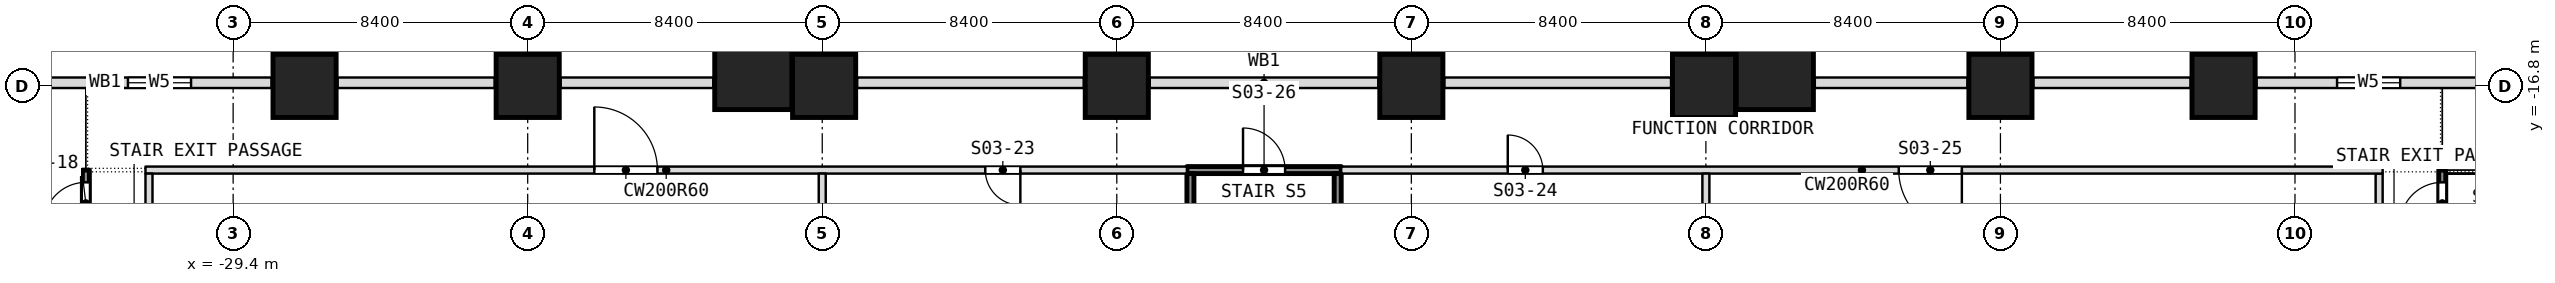
"""IFC4 building model, lengths in metres.
Left out: names, types, materials, properties, quantities, classifications, styles, units other than length and angle.
Written with IfcOpenShell. Run it as: python <this file> out.ifc"""

import sys

from ifc_helpers import new_model, si_unit, direction, frame, frame_2d, origin, origin_2d, place, context, subcontext, project, spatial, polyline, rectangle, outline, extrude, element, fill, save


model = new_model("IFC4")
c1 = context("Model", 3, precision=1e-05, world=origin(), true_north=direction((0.0, 1.0)))
c2 = subcontext(c1, "Body", "Model", "MODEL_VIEW")
j1 = project(units=[si_unit("LENGTHUNIT", "METRE"), si_unit("PLANEANGLEUNIT", "RADIAN")], contexts=[c1])
p1 = place(None, origin())
s1 = spatial("IfcSite", under=j1, at=p1, CompositionType="ELEMENT")
p2 = place(p1, origin())
s2 = spatial("IfcBuilding", under=s1, at=p2, CompositionType="ELEMENT")
p3 = place(p2, frame((0.0, 0.0, 13.0)))
s3 = spatial("IfcBuildingStorey", under=s2, at=p3, CompositionType="ELEMENT", Elevation=13.0)
for number, where, z_axis, x_axis in (
    (1, (-21.0, -16.8, 0.0), (0.0, 0.0, 1.0), (1.0, 0.0, 0.0)),
    (2, (-12.546, -16.8, 0.0), (0.0, 0.0, 1.0), (1.0, 0.0, 0.0)),
    (3, (-4.2, -16.8, 0.0), (0.0, 0.0, 1.0), (1.0, 0.0, 0.0)),
    (4, (4.2, -16.8, 0.0), (0.0, 0.0, 1.0), (1.0, 0.0, 0.0)),
    (5, (12.546, -16.8, 0.0), (0.0, 0.0, 1.0), (1.0, 0.0, 0.0)),
    (6, (21.0, -16.8, 0.0), (0.0, 0.0, 1.0), (1.0, 0.0, 0.0)),
    (7, (-27.363, -16.8, 0.0), (0.0, 0.0, 1.0), (1.0, 0.0, 0.0)),
    (8, (27.363, -16.8, 0.0), (0.0, 0.0, 1.0), (1.0, 0.0, 0.0)),
):
    element("IfcColumn", number, at=place(p3, frame(where, z_axis=z_axis, x_axis=x_axis)), inside=s3, PredefinedType="COLUMN", context=c2, shape_type="SweptSolid", body=[
        extrude(rectangle(XDim=1.8, YDim=1.8, at=origin_2d()), origin(), (0.0, 0.0, 1.0), 8.0),
    ])
for number, where, z_axis, x_axis in (
    (9, (-14.566, -16.375, 0.0), (0.0, 0.0, 1.0), (1.0, 0.0, 0.0)),
    (10, (14.566, -16.375, 0.0), (0.0, 0.0, 1.0), (1.0, 0.0, 0.0)),
):
    element("IfcColumn", number, at=place(p3, frame(where, z_axis=z_axis, x_axis=x_axis)), inside=s3, PredefinedType="COLUMN", context=c2, shape_type="SweptSolid", body=[
        extrude(rectangle(XDim=2.2, YDim=2.2, at=origin_2d()), origin(), (0.0, 0.0, 1.0), 8.0),
    ])
p4 = place(p3, frame((37.8, -18.0, 7.414), z_axis=(1.0, 0.0, 0.0), x_axis=(0.0, 0.449444543056, 0.893308234999)))
e11 = element("IfcWall", 11, at=p4, inside=s3, PredefinedType="SOLIDWALL", context=c2, shape_type="SweptSolid", body=[
    extrude(outline(polyline([(0.0, 0.0), (0.656, 0.0), (-0.016, 1.335), (-7.162, -2.26), (0.0, 0.0)])), origin(), (0.0, 0.0, -1.0), 4.2),
])
p5 = place(p3, frame((-37.8, -18.0, 7.414), z_axis=(-1.0, 0.0, 0.0), x_axis=(0.0, -0.159774095721, -0.987153604226)))
e12 = element("IfcWall", 12, at=p5, inside=s3, PredefinedType="SOLIDWALL", context=c2, shape_type="SweptSolid", body=[
    extrude(outline(polyline([(0.0, 0.0), (7.51, 2.22e-16), (-0.387, 1.278), (-0.626, -0.197), (0.0, 0.0)])), origin(), (0.0, 0.0, -1.0), 4.2),
])
p6 = place(p3, frame((33.6, -22.3, 0.0), z_axis=(0.0, 0.0, 1.0), x_axis=(0.0, 1.0, 0.0)))
e13 = element("IfcWall", 13, at=p6, inside=s3, PredefinedType="PARTITIONING", context=c2, shape_type="SweptSolid", body=[
    extrude(rectangle(XDim=3.1, YDim=0.2, at=frame_2d((1.55, 0.0))), origin(), (0.0, 0.0, 1.0), 7.68),
])
p7 = place(p6, frame((1.55, 0.0, 0.0)))
e14 = element("IfcOpeningElement", 14, at=p7, cuts=e13, PredefinedType="OPENING", context=c2, shape_type="SweptSolid", body=[
    extrude(rectangle(XDim=1.2, YDim=2.1, at=frame_2d((0.6, 1.05))), frame((0.0, 0.1, 0.0), z_axis=(0.0, -1.0, 0.0), x_axis=(1.0, 0.0, 0.0)), (0.0, 0.0, 1.0), 0.2),
])
p8 = place(p3, frame((31.8, -22.1, 0.0), z_axis=(0.0, 0.0, 1.0), x_axis=(0.0, 1.0, 0.0)))
e15 = element("IfcWall", 15, at=p8, inside=s3, PredefinedType="PARTITIONING", context=c2, shape_type="SweptSolid", body=[
    extrude(rectangle(XDim=2.8, YDim=0.2, at=frame_2d((1.4, 0.0))), origin(), (0.0, 0.0, 1.0), 7.68),
])
p9 = place(p3, frame((-31.9, -19.2, 0.0), z_axis=(0.0, 0.0, 1.0), x_axis=(1.0, 0.0, 0.0)))
e16 = element("IfcWall", 16, at=p9, inside=s3, PredefinedType="PARTITIONING", context=c2, shape_type="SweptSolid", body=[
    extrude(rectangle(XDim=29.7, YDim=0.2, at=frame_2d((14.85, 0.0))), origin(), (0.0, 0.0, 1.0), 7.68),
])
p10 = place(p9, frame((12.8, 0.0, 0.0)))
e17 = element("IfcOpeningElement", 17, at=p10, cuts=e16, PredefinedType="OPENING", context=c2, shape_type="SweptSolid", body=[
    extrude(rectangle(XDim=1.8, YDim=2.1, at=frame_2d((0.9, 1.05))), frame((0.0, 0.1, 0.0), z_axis=(0.0, -1.0, 0.0), x_axis=(1.0, 0.0, 0.0)), (0.0, 0.0, 1.0), 0.2),
])
p11 = place(p9, frame((23.95, 0.0, 0.0)))
e18 = element("IfcOpeningElement", 18, at=p11, cuts=e16, PredefinedType="OPENING", context=c2, shape_type="SweptSolid", body=[
    extrude(rectangle(XDim=1.0, YDim=2.1, at=frame_2d((0.5, 1.05))), frame((0.0, 0.1, 0.0), z_axis=(0.0, -1.0, 0.0), x_axis=(1.0, 0.0, 0.0)), (0.0, 0.0, 1.0), 0.2),
])
p12 = place(p3, frame((2.2, -19.2, 0.0), z_axis=(0.0, 0.0, 1.0), x_axis=(1.0, 0.0, 0.0)))
e19 = element("IfcWall", 19, at=p12, inside=s3, PredefinedType="PARTITIONING", context=c2, shape_type="SweptSolid", body=[
    extrude(rectangle(XDim=29.7, YDim=0.2, at=frame_2d((14.85, 0.0))), origin(), (0.0, 0.0, 1.0), 7.68),
])
p13 = place(p12, frame((4.75, 0.0, 0.0)))
e20 = element("IfcOpeningElement", 20, at=p13, cuts=e19, PredefinedType="OPENING", context=c2, shape_type="SweptSolid", body=[
    extrude(rectangle(XDim=1.0, YDim=2.1, at=frame_2d((0.5, 1.05))), frame((0.0, 0.1, 0.0), z_axis=(0.0, -1.0, 0.0), x_axis=(1.0, 0.0, 0.0)), (0.0, 0.0, 1.0), 0.2),
])
p14 = place(p12, frame((15.9, 0.0, 0.0)))
e21 = element("IfcOpeningElement", 21, at=p14, cuts=e19, PredefinedType="OPENING", context=c2, shape_type="SweptSolid", body=[
    extrude(rectangle(XDim=1.8, YDim=2.1, at=frame_2d((0.9, 1.05))), frame((0.0, 0.1, 0.0), z_axis=(0.0, -1.0, 0.0), x_axis=(1.0, 0.0, 0.0)), (0.0, 0.0, 1.0), 0.2),
])
p15 = place(p3, frame((-2.2, -19.2, 0.0), z_axis=(0.0, 0.0, 1.0), x_axis=(1.0, 0.0, 0.0)))
e22 = element("IfcWall", 22, at=p15, inside=s3, PredefinedType="PARTITIONING", context=c2, shape_type="SweptSolid", body=[
    extrude(rectangle(XDim=4.4, YDim=0.2, at=frame_2d((2.2, 0.0))), origin(), (0.0, 0.0, 1.0), 7.68),
])
p16 = place(p15, frame((1.6, 0.0, 0.0)))
e23 = element("IfcOpeningElement", 23, at=p16, cuts=e22, PredefinedType="OPENING", context=c2, shape_type="SweptSolid", body=[
    extrude(rectangle(XDim=1.2, YDim=2.1, at=frame_2d((0.6, 1.05))), frame((0.0, 0.1, 0.0), z_axis=(0.0, -1.0, 0.0), x_axis=(1.0, 0.0, 0.0)), (0.0, 0.0, 1.0), 0.2),
])
p17 = place(p3, frame((12.6, -25.5, 0.0), z_axis=(0.0, 0.0, 1.0), x_axis=(0.0, 1.0, 0.0)))
e24 = element("IfcWall", 24, at=p17, inside=s3, PredefinedType="PARTITIONING", context=c2, shape_type="SweptSolid", body=[
    extrude(rectangle(XDim=6.2, YDim=0.2, at=frame_2d((3.1, 0.0))), origin(), (0.0, 0.0, 1.0), 7.68),
])
for number, where, z_axis, x_axis in (
    (25, (2.1, -25.14, 0.0), (0.0, 0.0, 1.0), (0.0, 1.0, 0.0)),
    (26, (-2.1, -25.14, 0.0), (0.0, 0.0, 1.0), (0.0, 1.0, 0.0)),
):
    element("IfcWall", number, at=place(p3, frame(where, z_axis=z_axis, x_axis=x_axis)), inside=s3, PredefinedType="PARTITIONING", context=c2, shape_type="SweptSolid", body=[
        extrude(rectangle(XDim=5.84, YDim=0.2, at=frame_2d((2.92, 0.0))), origin(), (0.0, 0.0, 1.0), 7.68),
    ])
p18 = place(p3, frame((-12.6, -25.5, 0.0), z_axis=(0.0, 0.0, 1.0), x_axis=(0.0, 1.0, 0.0)))
e27 = element("IfcWall", 27, at=p18, inside=s3, PredefinedType="PARTITIONING", context=c2, shape_type="SweptSolid", body=[
    extrude(rectangle(XDim=6.2, YDim=0.2, at=frame_2d((3.1, 0.0))), origin(), (0.0, 0.0, 1.0), 7.68),
])
p19 = place(p3, frame((-31.8, -22.1, 0.0), z_axis=(0.0, 0.0, 1.0), x_axis=(0.0, 1.0, 0.0)))
e28 = element("IfcWall", 28, at=p19, inside=s3, PredefinedType="PARTITIONING", context=c2, shape_type="SweptSolid", body=[
    extrude(rectangle(XDim=2.8, YDim=0.2, at=frame_2d((1.4, 0.0))), origin(), (0.0, 0.0, 1.0), 7.68),
])
p20 = place(p3, frame((-33.6, -22.3, 0.0), z_axis=(0.0, 0.0, 1.0), x_axis=(0.0, 1.0, 0.0)))
e29 = element("IfcWall", 29, at=p20, inside=s3, PredefinedType="PARTITIONING", context=c2, shape_type="SweptSolid", body=[
    extrude(rectangle(XDim=3.1, YDim=0.2, at=frame_2d((1.55, 0.0))), origin(), (0.0, 0.0, 1.0), 7.68),
])
p21 = place(p20, frame((1.55, 0.0, 0.0)))
e30 = element("IfcOpeningElement", 30, at=p21, cuts=e29, PredefinedType="OPENING", context=c2, shape_type="SweptSolid", body=[
    extrude(rectangle(XDim=1.2, YDim=2.1, at=frame_2d((0.6, 1.05))), frame((0.0, 0.1, 0.0), z_axis=(0.0, -1.0, 0.0), x_axis=(1.0, 0.0, 0.0)), (0.0, 0.0, 1.0), 0.2),
])
p22 = place(p3, frame((37.8, -16.71, 0.0), z_axis=(0.0, 0.0, 1.0), x_axis=(-1.0, 0.0, 0.0)))
e31 = element("IfcWall", 31, at=p22, inside=s3, PredefinedType="NOTDEFINED", context=c2, shape_type="SweptSolid", body=[
    extrude(rectangle(XDim=9.497, YDim=0.3, at=frame_2d((4.749, 0.0))), origin(), (0.0, 0.0, 1.0), 6.78),
])
p23 = place(p22, frame((5.4, 0.0, 1.2)))
e32 = element("IfcOpeningElement", 32, at=p23, cuts=e31, PredefinedType="OPENING", context=c2, shape_type="SweptSolid", body=[
    extrude(rectangle(XDim=1.8, YDim=2.4, at=frame_2d((0.9, 1.2))), frame((0.0, 0.15, 0.0), z_axis=(0.0, -1.0, 0.0), x_axis=(1.0, 0.0, 0.0)), (0.0, 0.0, 1.0), 0.3),
])
p24 = place(p3, frame((26.423, -16.71, 0.0), z_axis=(0.0, 0.0, 1.0), x_axis=(-1.0, 0.0, 0.0)))
e33 = element("IfcWall", 33, at=p24, inside=s3, PredefinedType="NOTDEFINED", context=c2, shape_type="SweptSolid", body=[
    extrude(rectangle(XDim=4.483, YDim=0.3, at=frame_2d((2.242, 0.0))), origin(), (0.0, 0.0, 1.0), 6.78),
])
p25 = place(p3, frame((20.06, -16.71, 0.0), z_axis=(0.0, 0.0, 1.0), x_axis=(-1.0, 0.0, 0.0)))
e34 = element("IfcWall", 34, at=p25, inside=s3, PredefinedType="NOTDEFINED", context=c2, shape_type="SweptSolid", body=[
    extrude(rectangle(XDim=4.354, YDim=0.3, at=frame_2d((2.177, 0.0))), origin(), (0.0, 0.0, 1.0), 6.78),
])
p26 = place(p3, frame((11.606, -16.71, 0.0), z_axis=(0.0, 0.0, 1.0), x_axis=(-1.0, 0.0, 0.0)))
e35 = element("IfcWall", 35, at=p26, inside=s3, PredefinedType="NOTDEFINED", context=c2, shape_type="SweptSolid", body=[
    extrude(rectangle(XDim=6.466, YDim=0.3, at=frame_2d((3.233, 0.0))), origin(), (0.0, 0.0, 1.0), 6.78),
])
p27 = place(p3, frame((3.26, -16.71, 0.0), z_axis=(0.0, 0.0, 1.0), x_axis=(-1.0, 0.0, 0.0)))
e36 = element("IfcWall", 36, at=p27, inside=s3, PredefinedType="NOTDEFINED", context=c2, shape_type="SweptSolid", body=[
    extrude(rectangle(XDim=6.52, YDim=0.3, at=frame_2d((3.26, 0.0))), origin(), (0.0, 0.0, 1.0), 6.78),
])
p28 = place(p3, frame((-5.14, -16.71, 0.0), z_axis=(0.0, 0.0, 1.0), x_axis=(-1.0, 0.0, 0.0)))
e37 = element("IfcWall", 37, at=p28, inside=s3, PredefinedType="NOTDEFINED", context=c2, shape_type="SweptSolid", body=[
    extrude(rectangle(XDim=6.466, YDim=0.3, at=frame_2d((3.233, 0.0))), origin(), (0.0, 0.0, 1.0), 6.78),
])
p29 = place(p3, frame((-15.706, -16.71, 0.0), z_axis=(0.0, 0.0, 1.0), x_axis=(-1.0, 0.0, 0.0)))
e38 = element("IfcWall", 38, at=p29, inside=s3, PredefinedType="NOTDEFINED", context=c2, shape_type="SweptSolid", body=[
    extrude(rectangle(XDim=4.354, YDim=0.3, at=frame_2d((2.177, 0.0))), origin(), (0.0, 0.0, 1.0), 6.78),
])
p30 = place(p3, frame((-21.94, -16.71, 0.0), z_axis=(0.0, 0.0, 1.0), x_axis=(-1.0, 0.0, 0.0)))
e39 = element("IfcWall", 39, at=p30, inside=s3, PredefinedType="NOTDEFINED", context=c2, shape_type="SweptSolid", body=[
    extrude(rectangle(XDim=4.483, YDim=0.3, at=frame_2d((2.242, 0.0))), origin(), (0.0, 0.0, 1.0), 6.78),
])
p31 = place(p3, frame((-28.303, -16.71, 0.0), z_axis=(0.0, 0.0, 1.0), x_axis=(-1.0, 0.0, 0.0)))
e40 = element("IfcWall", 40, at=p31, inside=s3, PredefinedType="NOTDEFINED", context=c2, shape_type="SweptSolid", body=[
    extrude(rectangle(XDim=9.497, YDim=0.3, at=frame_2d((4.749, 0.0))), origin(), (0.0, 0.0, 1.0), 6.78),
])
p32 = place(p31, frame((2.297, 0.0, 1.2)))
e41 = element("IfcOpeningElement", 41, at=p32, cuts=e40, PredefinedType="OPENING", context=c2, shape_type="SweptSolid", body=[
    extrude(rectangle(XDim=1.8, YDim=2.4, at=frame_2d((0.9, 1.2))), frame((0.0, 0.15, 0.0), z_axis=(0.0, -1.0, 0.0), x_axis=(1.0, 0.0, 0.0)), (0.0, 0.0, 1.0), 0.3),
])
p33 = place(p21, origin())
e42 = element("IfcDoor", 42, at=p33, inside=s3, OperationType="SINGLE_SWING_RIGHT", PredefinedType="DOOR", context=c2, shape_type="SweptSolid", body=[
    extrude(rectangle(XDim=1.2, YDim=2.1, at=frame_2d((0.6, 1.05))), frame((0.0, 0.025, 0.0), z_axis=(0.0, -1.0, 0.0), x_axis=(1.0, 0.0, 0.0)), (0.0, 0.0, 1.0), 0.05),
])
fill(e30, e42)
p34 = place(p7, origin())
e43 = element("IfcDoor", 43, at=p34, inside=s3, OperationType="SINGLE_SWING_LEFT", PredefinedType="DOOR", context=c2, shape_type="SweptSolid", body=[
    extrude(rectangle(XDim=1.2, YDim=2.1, at=frame_2d((0.6, 1.05))), frame((0.0, 0.025, 0.0), z_axis=(0.0, -1.0, 0.0), x_axis=(1.0, 0.0, 0.0)), (0.0, 0.0, 1.0), 0.05),
])
fill(e14, e43)
p35 = place(p10, origin())
e44 = element("IfcDoor", 44, at=p35, inside=s3, OperationType="DOUBLE_DOOR_SINGLE_SWING", PredefinedType="DOOR", context=c2, shape_type="SweptSolid", body=[
    extrude(rectangle(XDim=1.8, YDim=2.1, at=frame_2d((0.9, 1.05))), frame((0.0, 0.025, 0.0), z_axis=(0.0, -1.0, 0.0), x_axis=(1.0, 0.0, 0.0)), (0.0, 0.0, 1.0), 0.05),
])
fill(e17, e44)
p36 = place(p11, origin())
e45 = element("IfcDoor", 45, at=p36, inside=s3, OperationType="SINGLE_SWING_RIGHT", PredefinedType="DOOR", context=c2, shape_type="SweptSolid", body=[
    extrude(rectangle(XDim=1.0, YDim=2.1, at=frame_2d((0.5, 1.05))), frame((0.0, 0.025, 0.0), z_axis=(0.0, -1.0, 0.0), x_axis=(1.0, 0.0, 0.0)), (0.0, 0.0, 1.0), 0.05),
])
fill(e18, e45)
p37 = place(p13, origin())
e46 = element("IfcDoor", 46, at=p37, inside=s3, OperationType="SINGLE_SWING_LEFT", PredefinedType="DOOR", context=c2, shape_type="SweptSolid", body=[
    extrude(rectangle(XDim=1.0, YDim=2.1, at=frame_2d((0.5, 1.05))), frame((0.0, 0.025, 0.0), z_axis=(0.0, -1.0, 0.0), x_axis=(1.0, 0.0, 0.0)), (0.0, 0.0, 1.0), 0.05),
])
fill(e20, e46)
p38 = place(p14, origin())
e47 = element("IfcDoor", 47, at=p38, inside=s3, OperationType="DOUBLE_DOOR_SINGLE_SWING", PredefinedType="DOOR", context=c2, shape_type="SweptSolid", body=[
    extrude(rectangle(XDim=1.8, YDim=2.1, at=frame_2d((0.9, 1.05))), frame((0.0, 0.025, 0.0), z_axis=(0.0, -1.0, 0.0), x_axis=(1.0, 0.0, 0.0)), (0.0, 0.0, 1.0), 0.05),
])
fill(e21, e47)
p39 = place(p16, origin())
e48 = element("IfcDoor", 48, at=p39, inside=s3, OperationType="SINGLE_SWING_RIGHT", PredefinedType="DOOR", context=c2, shape_type="SweptSolid", body=[
    extrude(rectangle(XDim=1.2, YDim=2.1, at=frame_2d((0.6, 1.05))), frame((0.0, 0.025, 0.0), z_axis=(0.0, -1.0, 0.0), x_axis=(1.0, 0.0, 0.0)), (0.0, 0.0, 1.0), 0.05),
])
fill(e23, e48)
p40 = place(p23, origin())
e49 = element("IfcWindow", 49, at=p40, inside=s3, PartitioningType="SINGLE_PANEL", PredefinedType="WINDOW", context=c2, shape_type="SweptSolid", body=[
    extrude(rectangle(XDim=1.8, YDim=2.4, at=frame_2d((0.9, 1.2))), frame((0.0, 0.03, 0.0), z_axis=(0.0, -1.0, 0.0), x_axis=(1.0, 0.0, 0.0)), (0.0, 0.0, 1.0), 0.06),
])
fill(e32, e49)
p41 = place(p32, origin())
e50 = element("IfcWindow", 50, at=p41, inside=s3, PartitioningType="SINGLE_PANEL", PredefinedType="WINDOW", context=c2, shape_type="SweptSolid", body=[
    extrude(rectangle(XDim=1.8, YDim=2.4, at=frame_2d((0.9, 1.2))), frame((0.0, 0.03, 0.0), z_axis=(0.0, -1.0, 0.0), x_axis=(1.0, 0.0, 0.0)), (0.0, 0.0, 1.0), 0.06),
])
fill(e41, e50)
save(model, sys.argv[1])
